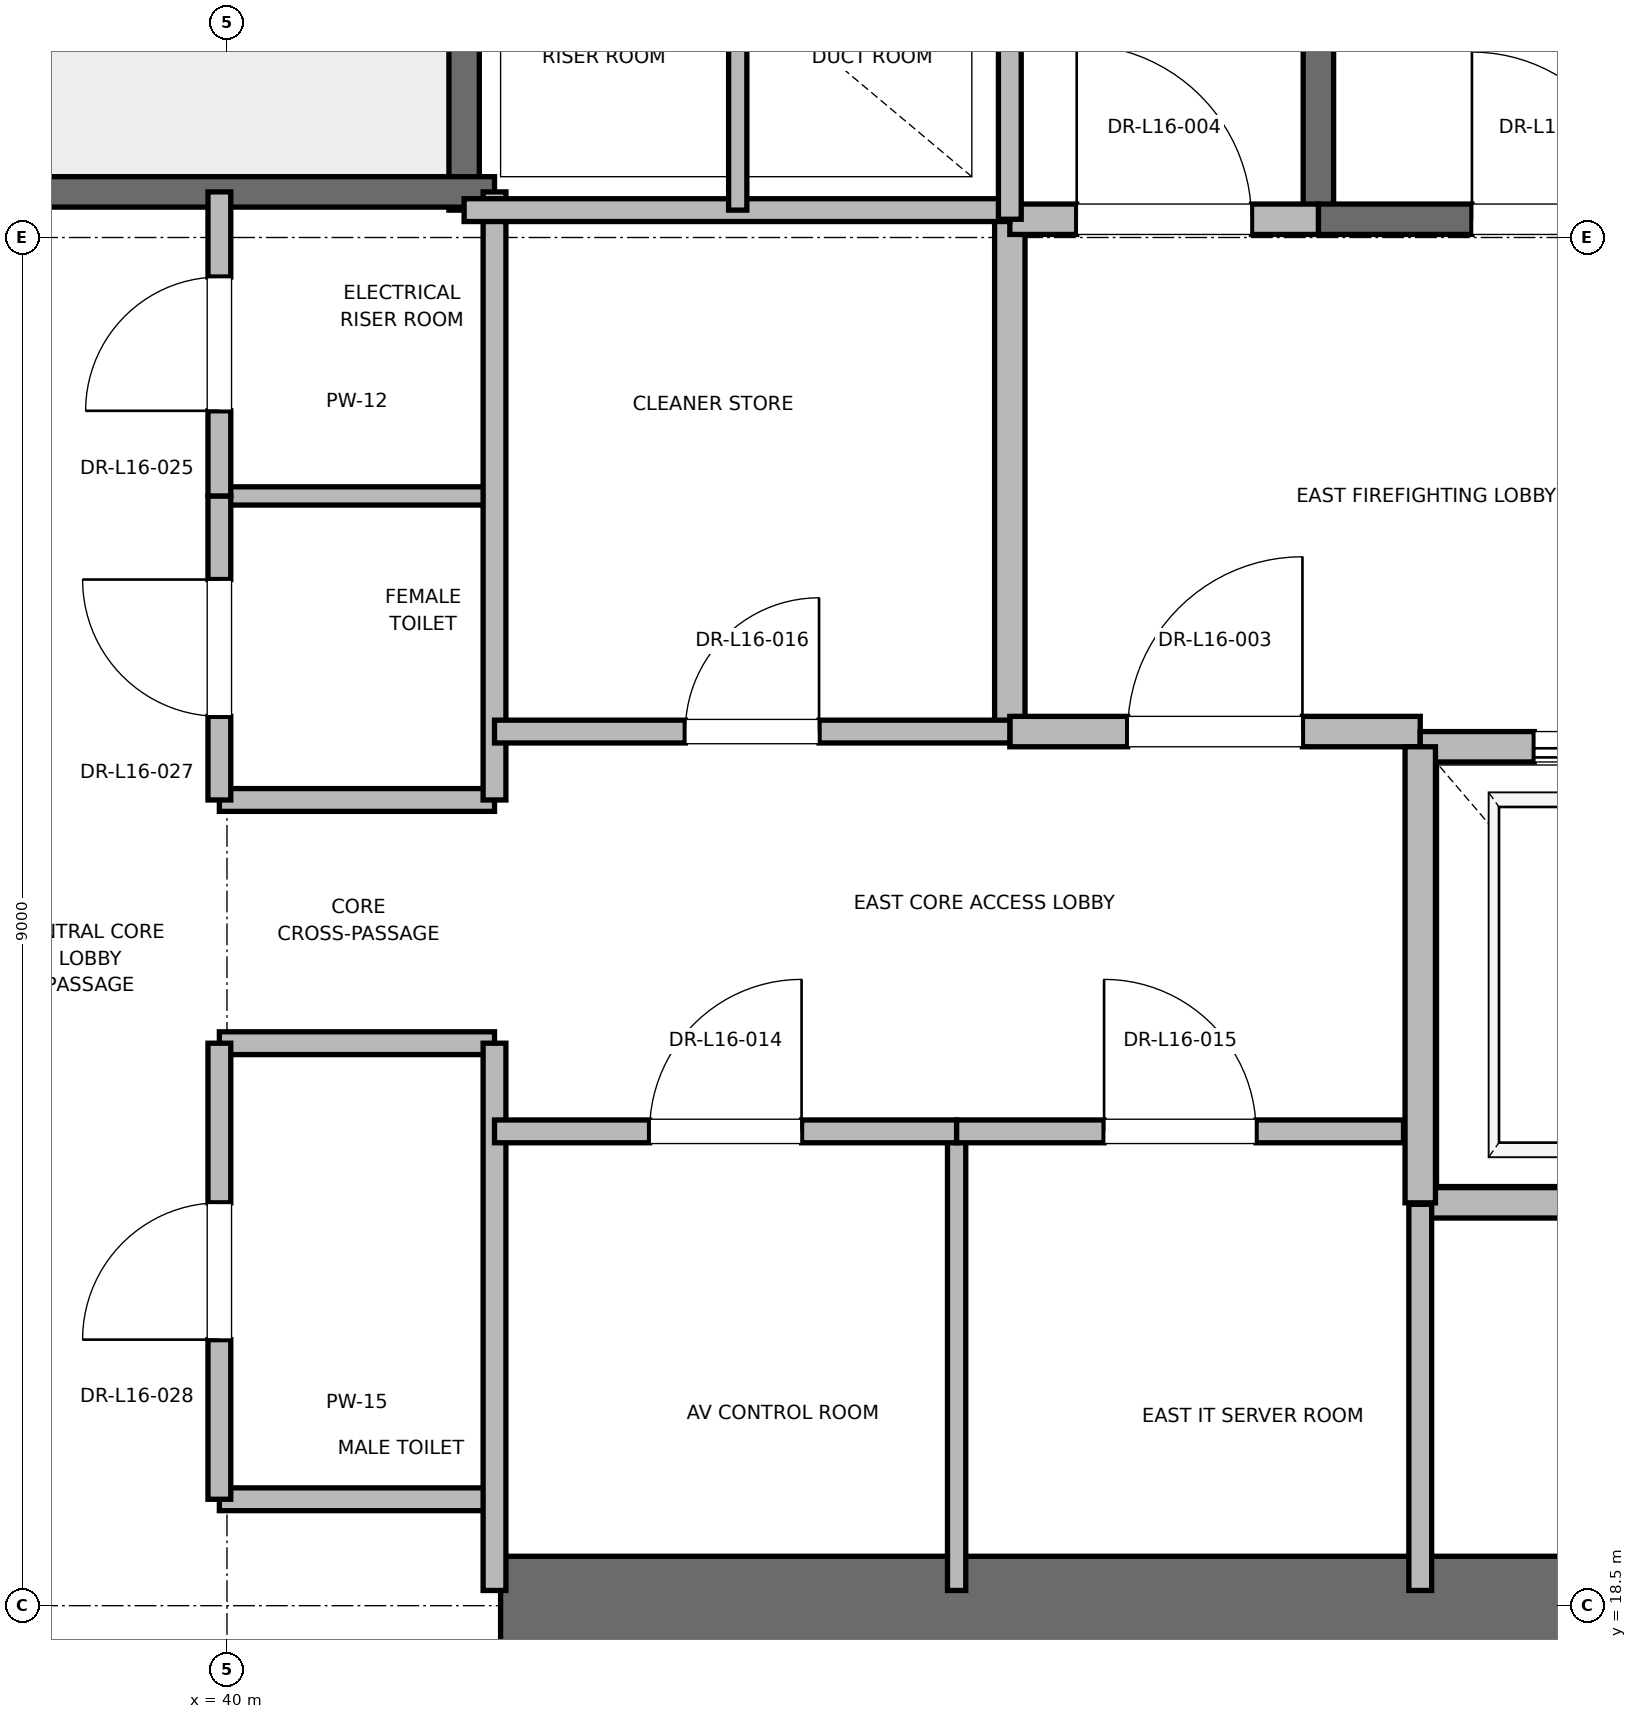
"""IFC4 building model, lengths in metres.
Left out: names, types, materials, properties, quantities, classifications, styles, units other than length and angle.
Written with IfcOpenShell. Run it as: python <this file> out.ifc"""

import sys

from ifc_helpers import new_model, si_unit, direction, frame, frame_2d, origin, place, context, subcontext, project, spatial, rectangle, extrude, element, fill, save


model = new_model("IFC4")
c1 = context("Model", 3, precision=1e-05, world=origin(), true_north=direction((0.0, 1.0)))
c2 = subcontext(c1, "Body", "Model", "MODEL_VIEW")
j1 = project(units=[si_unit("LENGTHUNIT", "METRE"), si_unit("PLANEANGLEUNIT", "RADIAN")], contexts=[c1])
p1 = place(None, origin())
s1 = spatial("IfcSite", under=j1, at=p1, CompositionType="ELEMENT")
p2 = place(p1, origin())
s2 = spatial("IfcBuilding", under=s1, at=p2, CompositionType="ELEMENT")
p3 = place(p2, frame((0.0, 0.0, 71.6)))
s3 = spatial("IfcBuildingStorey", under=s2, at=p3, CompositionType="ELEMENT", Elevation=71.6)
p4 = place(p3, frame((41.8, 18.5, 0.0), z_axis=(0.0, 0.0, 1.0), x_axis=(1.0, 0.0, 0.0)))
e1 = element("IfcWall", 1, at=p4, inside=s3, PredefinedType="SHEAR", context=c2, shape_type="SweptSolid", body=[
    extrude(rectangle(XDim=9.2, YDim=0.65, at=frame_2d((4.6, 0.0))), origin(), (0.0, 0.0, 1.0), 3.76),
])
p5 = place(p3, frame((47.18, 27.62, 0.0), z_axis=(0.0, 0.0, 1.0), x_axis=(0.0, 1.0, 0.0)))
e2 = element("IfcWall", 2, at=p5, inside=s3, PredefinedType="SOLIDWALL", context=c2, shape_type="SweptSolid", body=[
    extrude(rectangle(XDim=8.18, YDim=0.2, at=frame_2d((4.09, 0.0))), origin(), (0.0, 0.0, 1.0), 3.76),
])
p6 = place(p3, frame((47.18, 27.62, 0.0), z_axis=(0.0, 0.0, 1.0), x_axis=(1.0, 0.0, 0.0)))
e3 = element("IfcWall", 3, at=p6, inside=s3, PredefinedType="SOLIDWALL", context=c2, shape_type="SweptSolid", body=[
    extrude(rectangle(XDim=3.12, YDim=0.2, at=frame_2d((1.56, 0.0))), origin(), (0.0, 0.0, 1.0), 3.76),
])
p7 = place(p6, frame((1.01, 0.0, 0.0)))
e4 = element("IfcOpeningElement", 4, at=p7, cuts=e3, PredefinedType="OPENING", context=c2, shape_type="SweptSolid", body=[
    extrude(rectangle(XDim=1.1, YDim=2.15, at=frame_2d((0.55, 1.075))), frame((0.0, 0.1, 0.0), z_axis=(0.0, -1.0, 0.0), x_axis=(1.0, 0.0, 0.0)), (0.0, 0.0, 1.0), 0.2),
])
p8 = place(p3, frame((41.56, 27.68, 0.0), z_axis=(0.0, 0.0, 1.0), x_axis=(0.0, 1.0, 0.0)))
e5 = element("IfcWall", 5, at=p8, inside=s3, PredefinedType="SOLIDWALL", context=c2, shape_type="SweptSolid", body=[
    extrude(rectangle(XDim=8.57, YDim=0.2, at=frame_2d((4.285, 0.0))), origin(), (0.0, 0.0, 1.0), 3.76),
])
p9 = place(p3, frame((38.44, 27.8, 0.0), z_axis=(0.0, 0.0, 1.0), x_axis=(1.0, 0.0, 0.0)))
e6 = element("IfcWall", 6, at=p9, inside=s3, PredefinedType="SOLIDWALL", context=c2, shape_type="SweptSolid", body=[
    extrude(rectangle(XDim=3.32, YDim=0.2, at=frame_2d((1.66, 0.0))), origin(), (0.0, 0.0, 1.0), 3.76),
])
p10 = place(p3, frame((45.15, 24.25, 0.0), z_axis=(0.0, 0.0, 1.0), x_axis=(0.0, 1.0, 0.0)))
e7 = element("IfcWall", 7, at=p10, inside=s3, PredefinedType="PARTITIONING", context=c2, shape_type="SweptSolid", body=[
    extrude(rectangle(XDim=3.37, YDim=0.2, at=frame_2d((1.685, 0.0))), origin(), (0.0, 0.0, 1.0), 3.76),
])
p11 = place(p3, frame((45.15, 24.25, 0.0), z_axis=(0.0, 0.0, 1.0), x_axis=(1.0, 0.0, 0.0)))
e8 = element("IfcWall", 8, at=p11, inside=s3, PredefinedType="PARTITIONING", context=c2, shape_type="SweptSolid", body=[
    extrude(rectangle(XDim=2.7, YDim=0.2, at=frame_2d((1.35, 0.0))), origin(), (0.0, 0.0, 1.0), 3.76),
])
p12 = place(p11, frame((0.775, 0.0, 0.0)))
e9 = element("IfcOpeningElement", 9, at=p12, cuts=e8, PredefinedType="OPENING", context=c2, shape_type="SweptSolid", body=[
    extrude(rectangle(XDim=1.15, YDim=2.2, at=frame_2d((0.575, 1.1))), frame((0.0, 0.1, 0.0), z_axis=(0.0, -1.0, 0.0), x_axis=(1.0, 0.0, 0.0)), (0.0, 0.0, 1.0), 0.2),
])
p13 = place(p3, frame((45.15, 27.62, 0.0), z_axis=(0.0, 0.0, 1.0), x_axis=(1.0, 0.0, 0.0)))
e10 = element("IfcWall", 10, at=p13, inside=s3, PredefinedType="PARTITIONING", context=c2, shape_type="SweptSolid", body=[
    extrude(rectangle(XDim=2.03, YDim=0.2, at=frame_2d((1.015, 0.0))), origin(), (0.0, 0.0, 1.0), 3.76),
])
p14 = place(p13, frame((0.44, 0.0, 0.0)))
e11 = element("IfcOpeningElement", 11, at=p14, cuts=e10, PredefinedType="OPENING", context=c2, shape_type="SweptSolid", body=[
    extrude(rectangle(XDim=1.15, YDim=2.2, at=frame_2d((0.575, 1.1))), frame((0.0, 0.1, 0.0), z_axis=(0.0, -1.0, 0.0), x_axis=(1.0, 0.0, 0.0)), (0.0, 0.0, 1.0), 0.2),
])
p15 = place(p3, frame((47.85, 21.15, 0.0), z_axis=(0.0, 0.0, 1.0), x_axis=(1.0, 0.0, 0.0)))
e12 = element("IfcWall", 12, at=p15, inside=s3, PredefinedType="SOLIDWALL", context=c2, shape_type="SweptSolid", body=[
    extrude(rectangle(XDim=2.6, YDim=0.2, at=frame_2d((1.3, 0.0))), origin(), (0.0, 0.0, 1.0), 3.76),
])
p16 = place(p3, frame((50.45, 24.15, 0.0), z_axis=(0.0, 0.0, 1.0), x_axis=(-1.0, 0.0, 0.0)))
e13 = element("IfcWall", 13, at=p16, inside=s3, PredefinedType="SOLIDWALL", context=c2, shape_type="SweptSolid", body=[
    extrude(rectangle(XDim=2.6, YDim=0.2, at=frame_2d((1.3, 0.0))), origin(), (0.0, 0.0, 1.0), 2.54),
])
p17 = place(p16, frame((0.75, 0.0, 0.0)))
e14 = element("IfcOpeningElement", 14, at=p17, cuts=e13, PredefinedType="OPENING", context=c2, shape_type="SweptSolid", body=[
    extrude(rectangle(XDim=1.1, YDim=2.2, at=frame_2d((0.55, 1.1))), frame((0.0, 0.1, 0.0), z_axis=(0.0, -1.0, 0.0), x_axis=(1.0, 0.0, 0.0)), (0.0, 0.0, 1.0), 0.2),
])
p18 = place(p3, frame((47.85, 24.15, 0.0), z_axis=(0.0, 0.0, 1.0), x_axis=(0.0, -1.0, 0.0)))
e15 = element("IfcWall", 15, at=p18, inside=s3, PredefinedType="SOLIDWALL", context=c2, shape_type="SweptSolid", body=[
    extrude(rectangle(XDim=3.0, YDim=0.2, at=frame_2d((1.5, 0.0))), origin(), (0.0, 0.0, 1.0), 3.76),
])
for number, where, z_axis, x_axis in (
    (16, (39.95, 19.2, 0.0), (0.0, 0.0, 1.0), (1.0, 0.0, 0.0)),
    (17, (39.95, 22.2, 0.0), (0.0, 0.0, 1.0), (1.0, 0.0, 0.0)),
    (18, (39.95, 23.8, 0.0), (0.0, 0.0, 1.0), (1.0, 0.0, 0.0)),
):
    element("IfcWall", number, at=place(p3, frame(where, z_axis=z_axis, x_axis=x_axis)), inside=s3, PredefinedType="PARTITIONING", context=c2, shape_type="SweptSolid", body=[
        extrude(rectangle(XDim=1.81, YDim=0.15, at=frame_2d((0.905, 0.0))), origin(), (0.0, 0.0, 1.0), 2.85),
    ])
p19 = place(p3, frame((39.95, 25.8, 0.0), z_axis=(0.0, 0.0, 1.0), x_axis=(1.0, 0.0, 0.0)))
e19 = element("IfcWall", 19, at=p19, inside=s3, PredefinedType="PARTITIONING", context=c2, shape_type="SweptSolid", body=[
    extrude(rectangle(XDim=1.81, YDim=0.12, at=frame_2d((0.905, 0.0))), origin(), (0.0, 0.0, 1.0), 2.85),
])
p20 = place(p3, frame((41.76, 18.6, 0.0), z_axis=(0.0, 0.0, 1.0), x_axis=(0.0, 1.0, 0.0)))
e20 = element("IfcWall", 20, at=p20, inside=s3, PredefinedType="PARTITIONING", context=c2, shape_type="SweptSolid", body=[
    extrude(rectangle(XDim=3.6, YDim=0.15, at=frame_2d((1.8, 0.0))), origin(), (0.0, 0.0, 1.0), 2.54),
])
p21 = place(p3, frame((41.76, 23.8, 0.0), z_axis=(0.0, 0.0, 1.0), x_axis=(0.0, 1.0, 0.0)))
e21 = element("IfcWall", 21, at=p21, inside=s3, PredefinedType="PARTITIONING", context=c2, shape_type="SweptSolid", body=[
    extrude(rectangle(XDim=4.0, YDim=0.15, at=frame_2d((2.0, 0.0))), origin(), (0.0, 0.0, 1.0), 2.85),
])
p22 = place(p3, frame((39.95, 19.2, 0.0), z_axis=(0.0, 0.0, 1.0), x_axis=(0.0, 1.0, 0.0)))
e22 = element("IfcWall", 22, at=p22, inside=s3, PredefinedType="PARTITIONING", context=c2, shape_type="SweptSolid", body=[
    extrude(rectangle(XDim=3.0, YDim=0.15, at=frame_2d((1.5, 0.0))), origin(), (0.0, 0.0, 1.0), 2.85),
])
p23 = place(p22, frame((1.05, 0.0, 0.0)))
e23 = element("IfcOpeningElement", 23, at=p23, cuts=e22, PredefinedType="OPENING", context=c2, shape_type="SweptSolid", body=[
    extrude(rectangle(XDim=0.9, YDim=2.1, at=frame_2d((0.45, 1.05))), frame((0.0, 0.075, 0.0), z_axis=(0.0, -1.0, 0.0), x_axis=(1.0, 0.0, 0.0)), (0.0, 0.0, 1.0), 0.15),
])
p24 = place(p3, frame((39.95, 23.8, 0.0), z_axis=(0.0, 0.0, 1.0), x_axis=(0.0, 1.0, 0.0)))
e24 = element("IfcWall", 24, at=p24, inside=s3, PredefinedType="PARTITIONING", context=c2, shape_type="SweptSolid", body=[
    extrude(rectangle(XDim=2.0, YDim=0.15, at=frame_2d((1.0, 0.0))), origin(), (0.0, 0.0, 1.0), 2.85),
])
p25 = place(p24, frame((0.55, 0.0, 0.0)))
e25 = element("IfcOpeningElement", 25, at=p25, cuts=e24, PredefinedType="OPENING", context=c2, shape_type="SweptSolid", body=[
    extrude(rectangle(XDim=0.9, YDim=2.1, at=frame_2d((0.45, 1.05))), frame((0.0, 0.075, 0.0), z_axis=(0.0, -1.0, 0.0), x_axis=(1.0, 0.0, 0.0)), (0.0, 0.0, 1.0), 0.15),
])
p26 = place(p3, frame((39.95, 25.8, 0.0), z_axis=(0.0, 0.0, 1.0), x_axis=(0.0, 1.0, 0.0)))
e26 = element("IfcWall", 26, at=p26, inside=s3, PredefinedType="PARTITIONING", context=c2, shape_type="SweptSolid", body=[
    extrude(rectangle(XDim=2.0, YDim=0.15, at=frame_2d((1.0, 0.0))), origin(), (0.0, 0.0, 1.0), 2.85),
])
p27 = place(p26, frame((0.56, 0.0, 0.0)))
e27 = element("IfcOpeningElement", 27, at=p27, cuts=e26, PredefinedType="OPENING", context=c2, shape_type="SweptSolid", body=[
    extrude(rectangle(XDim=0.88, YDim=2.1, at=frame_2d((0.44, 1.05))), frame((0.0, 0.075, 0.0), z_axis=(0.0, -1.0, 0.0), x_axis=(1.0, 0.0, 0.0)), (0.0, 0.0, 1.0), 0.15),
])
p28 = place(p3, frame((41.56, 27.68, 0.0), z_axis=(0.0, 0.0, 1.0), x_axis=(1.0, 0.0, 0.0)))
e28 = element("IfcWall", 28, at=p28, inside=s3, PredefinedType="PARTITIONING", context=c2, shape_type="SweptSolid", body=[
    extrude(rectangle(XDim=3.59, YDim=0.15, at=frame_2d((1.795, 0.0))), origin(), (0.0, 0.0, 1.0), 2.85),
])
p29 = place(p3, frame((47.85, 18.6, 0.0), z_axis=(0.0, 0.0, 1.0), x_axis=(0.0, 1.0, 0.0)))
e29 = element("IfcWall", 29, at=p29, inside=s3, PredefinedType="PARTITIONING", context=c2, shape_type="SweptSolid", body=[
    extrude(rectangle(XDim=2.54, YDim=0.15, at=frame_2d((1.27, 0.0))), origin(), (0.0, 0.0, 1.0), 2.85),
])
p30 = place(p3, frame((44.8, 18.6, 0.0), z_axis=(0.0, 0.0, 1.0), x_axis=(0.0, 1.0, 0.0)))
e30 = element("IfcWall", 30, at=p30, inside=s3, PredefinedType="PARTITIONING", context=c2, shape_type="SweptSolid", body=[
    extrude(rectangle(XDim=3.02, YDim=0.12, at=frame_2d((1.51, 0.0))), origin(), (0.0, 0.0, 1.0), 2.85),
])
p31 = place(p3, frame((41.76, 21.62, 0.0), z_axis=(0.0, 0.0, 1.0), x_axis=(1.0, 0.0, 0.0)))
e31 = element("IfcWall", 31, at=p31, inside=s3, PredefinedType="PARTITIONING", context=c2, shape_type="SweptSolid", body=[
    extrude(rectangle(XDim=3.04, YDim=0.15, at=frame_2d((1.52, 0.0))), origin(), (0.0, 0.0, 1.0), 2.85),
])
p32 = place(p31, frame((1.02, 0.0, 0.0)))
e32 = element("IfcOpeningElement", 32, at=p32, cuts=e31, PredefinedType="OPENING", context=c2, shape_type="SweptSolid", body=[
    extrude(rectangle(XDim=1.0, YDim=2.15, at=frame_2d((0.5, 1.075))), frame((0.0, 0.075, 0.0), z_axis=(0.0, -1.0, 0.0), x_axis=(1.0, 0.0, 0.0)), (0.0, 0.0, 1.0), 0.15),
])
p33 = place(p3, frame((44.8, 21.62, 0.0), z_axis=(0.0, 0.0, 1.0), x_axis=(1.0, 0.0, 0.0)))
e33 = element("IfcWall", 33, at=p33, inside=s3, PredefinedType="PARTITIONING", context=c2, shape_type="SweptSolid", body=[
    extrude(rectangle(XDim=2.94, YDim=0.15, at=frame_2d((1.47, 0.0))), origin(), (0.0, 0.0, 1.0), 2.85),
])
p34 = place(p33, frame((0.97, 0.0, 0.0)))
e34 = element("IfcOpeningElement", 34, at=p34, cuts=e33, PredefinedType="OPENING", context=c2, shape_type="SweptSolid", body=[
    extrude(rectangle(XDim=1.0, YDim=2.15, at=frame_2d((0.5, 1.075))), frame((0.0, 0.075, 0.0), z_axis=(0.0, -1.0, 0.0), x_axis=(1.0, 0.0, 0.0)), (0.0, 0.0, 1.0), 0.15),
])
p35 = place(p3, frame((41.76, 24.25, 0.0), z_axis=(0.0, 0.0, 1.0), x_axis=(1.0, 0.0, 0.0)))
e35 = element("IfcWall", 35, at=p35, inside=s3, PredefinedType="PARTITIONING", context=c2, shape_type="SweptSolid", body=[
    extrude(rectangle(XDim=3.39, YDim=0.15, at=frame_2d((1.695, 0.0))), origin(), (0.0, 0.0, 1.0), 2.85),
])
p36 = place(p35, frame((1.255, 0.0, 0.0)))
e36 = element("IfcOpeningElement", 36, at=p36, cuts=e35, PredefinedType="OPENING", context=c2, shape_type="SweptSolid", body=[
    extrude(rectangle(XDim=0.88, YDim=2.1, at=frame_2d((0.44, 1.05))), frame((0.0, 0.075, 0.0), z_axis=(0.0, -1.0, 0.0), x_axis=(1.0, 0.0, 0.0)), (0.0, 0.0, 1.0), 0.15),
])
p37 = place(p3, frame((45.15, 27.62, 0.0), z_axis=(0.0, 0.0, 1.0), x_axis=(0.0, 1.0, 0.0)))
e37 = element("IfcWall", 37, at=p37, inside=s3, PredefinedType="PARTITIONING", context=c2, shape_type="SweptSolid", body=[
    extrude(rectangle(XDim=3.1, YDim=0.15, at=frame_2d((1.55, 0.0))), origin(), (0.0, 0.0, 1.0), 2.85),
])
p38 = place(p3, frame((43.36, 27.68, 0.0), z_axis=(0.0, 0.0, 1.0), x_axis=(0.0, 1.0, 0.0)))
e38 = element("IfcWall", 38, at=p38, inside=s3, PredefinedType="PARTITIONING", context=c2, shape_type="SweptSolid", body=[
    extrude(rectangle(XDim=3.04, YDim=0.12, at=frame_2d((1.52, 0.0))), origin(), (0.0, 0.0, 1.0), 2.85),
])
p39 = place(p7, origin())
e39 = element("IfcDoor", 39, at=p39, inside=s3, OperationType="SINGLE_SWING_LEFT", PredefinedType="DOOR", context=c2, shape_type="SweptSolid", body=[
    extrude(rectangle(XDim=1.1, YDim=2.15, at=frame_2d((0.55, 1.075))), frame((0.0, 0.025, 0.0), z_axis=(0.0, -1.0, 0.0), x_axis=(1.0, 0.0, 0.0)), (0.0, 0.0, 1.0), 0.05),
])
fill(e4, e39)
p40 = place(p12, origin())
e40 = element("IfcDoor", 40, at=p40, inside=s3, OperationType="SINGLE_SWING_RIGHT", PredefinedType="DOOR", context=c2, shape_type="SweptSolid", body=[
    extrude(rectangle(XDim=1.15, YDim=2.2, at=frame_2d((0.575, 1.1))), frame((0.0, 0.025, 0.0), z_axis=(0.0, -1.0, 0.0), x_axis=(1.0, 0.0, 0.0)), (0.0, 0.0, 1.0), 0.05),
])
fill(e9, e40)
p41 = place(p14, origin())
e41 = element("IfcDoor", 41, at=p41, inside=s3, OperationType="SINGLE_SWING_LEFT", PredefinedType="DOOR", context=c2, shape_type="SweptSolid", body=[
    extrude(rectangle(XDim=1.15, YDim=2.2, at=frame_2d((0.575, 1.1))), frame((0.0, 0.025, 0.0), z_axis=(0.0, -1.0, 0.0), x_axis=(1.0, 0.0, 0.0)), (0.0, 0.0, 1.0), 0.05),
])
fill(e11, e41)
p42 = place(p17, origin())
e42 = element("IfcDoor", 42, at=p42, inside=s3, OperationType="SLIDING_TO_RIGHT", PredefinedType="DOOR", context=c2, shape_type="SweptSolid", body=[
    extrude(rectangle(XDim=1.1, YDim=2.2, at=frame_2d((0.55, 1.1))), frame((0.0, 0.025, 0.0), z_axis=(0.0, -1.0, 0.0), x_axis=(1.0, 0.0, 0.0)), (0.0, 0.0, 1.0), 0.05),
])
fill(e14, e42)
p43 = place(p23, origin())
e43 = element("IfcDoor", 43, at=p43, inside=s3, OperationType="SINGLE_SWING_LEFT", PredefinedType="DOOR", context=c2, shape_type="SweptSolid", body=[
    extrude(rectangle(XDim=0.9, YDim=2.1, at=frame_2d((0.45, 1.05))), frame((0.0, 0.025, 0.0), z_axis=(0.0, -1.0, 0.0), x_axis=(1.0, 0.0, 0.0)), (0.0, 0.0, 1.0), 0.05),
])
fill(e23, e43)
p44 = place(p25, origin())
e44 = element("IfcDoor", 44, at=p44, inside=s3, OperationType="SINGLE_SWING_RIGHT", PredefinedType="DOOR", context=c2, shape_type="SweptSolid", body=[
    extrude(rectangle(XDim=0.9, YDim=2.1, at=frame_2d((0.45, 1.05))), frame((0.0, 0.025, 0.0), z_axis=(0.0, -1.0, 0.0), x_axis=(1.0, 0.0, 0.0)), (0.0, 0.0, 1.0), 0.05),
])
fill(e25, e44)
p45 = place(p27, origin())
e45 = element("IfcDoor", 45, at=p45, inside=s3, OperationType="SINGLE_SWING_LEFT", PredefinedType="DOOR", context=c2, shape_type="SweptSolid", body=[
    extrude(rectangle(XDim=0.88, YDim=2.1, at=frame_2d((0.44, 1.05))), frame((0.0, 0.025, 0.0), z_axis=(0.0, -1.0, 0.0), x_axis=(1.0, 0.0, 0.0)), (0.0, 0.0, 1.0), 0.05),
])
fill(e27, e45)
p46 = place(p32, origin())
e46 = element("IfcDoor", 46, at=p46, inside=s3, OperationType="SINGLE_SWING_RIGHT", PredefinedType="DOOR", context=c2, shape_type="SweptSolid", body=[
    extrude(rectangle(XDim=1.0, YDim=2.15, at=frame_2d((0.5, 1.075))), frame((0.0, 0.025, 0.0), z_axis=(0.0, -1.0, 0.0), x_axis=(1.0, 0.0, 0.0)), (0.0, 0.0, 1.0), 0.05),
])
fill(e32, e46)
p47 = place(p34, origin())
e47 = element("IfcDoor", 47, at=p47, inside=s3, OperationType="SINGLE_SWING_LEFT", PredefinedType="DOOR", context=c2, shape_type="SweptSolid", body=[
    extrude(rectangle(XDim=1.0, YDim=2.15, at=frame_2d((0.5, 1.075))), frame((0.0, 0.025, 0.0), z_axis=(0.0, -1.0, 0.0), x_axis=(1.0, 0.0, 0.0)), (0.0, 0.0, 1.0), 0.05),
])
fill(e34, e47)
p48 = place(p36, origin())
e48 = element("IfcDoor", 48, at=p48, inside=s3, OperationType="SINGLE_SWING_RIGHT", PredefinedType="DOOR", context=c2, shape_type="SweptSolid", body=[
    extrude(rectangle(XDim=0.88, YDim=2.1, at=frame_2d((0.44, 1.05))), frame((0.0, 0.025, 0.0), z_axis=(0.0, -1.0, 0.0), x_axis=(1.0, 0.0, 0.0)), (0.0, 0.0, 1.0), 0.05),
])
fill(e36, e48)
save(model, sys.argv[1])
